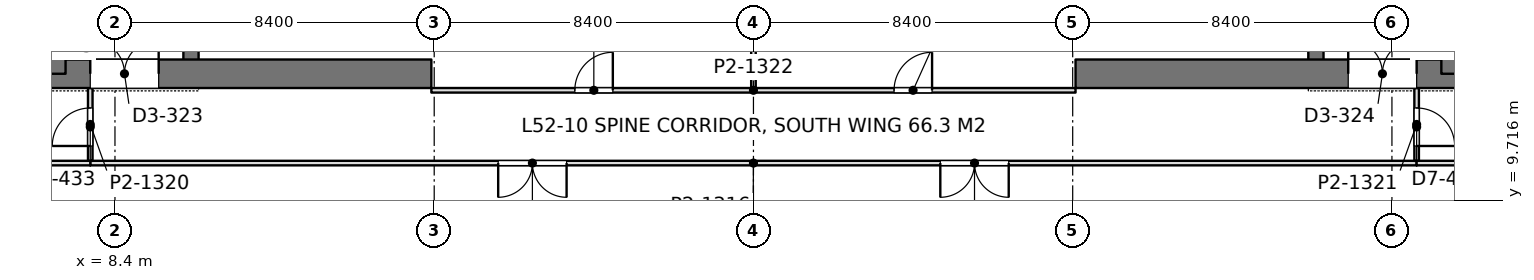
"""IFC4 building model, lengths in metres.
Left out: names, types, materials, properties, quantities, classifications, styles, units other than length and angle.
Written with IfcOpenShell. Run it as: python <this file> out.ifc"""

import sys

from ifc_helpers import new_model, si_unit, direction, frame, frame_2d, origin, place, context, subcontext, project, spatial, rectangle, extrude, element, fill, save


model = new_model("IFC4")
c1 = context("Model", 3, precision=1e-05, world=origin(), true_north=direction((0.0, 1.0)))
c2 = subcontext(c1, "Body", "Model", "MODEL_VIEW")
j1 = project(units=[si_unit("LENGTHUNIT", "METRE"), si_unit("PLANEANGLEUNIT", "RADIAN")], contexts=[c1])
p1 = place(None, origin())
s1 = spatial("IfcSite", under=j1, at=p1, CompositionType="ELEMENT")
p2 = place(p1, origin())
s2 = spatial("IfcBuilding", under=s1, at=p2, CompositionType="ELEMENT")
p3 = place(p2, frame((0.0, 0.0, 228.0)))
s3 = spatial("IfcBuildingStorey", under=s2, at=p3, CompositionType="ELEMENT", Elevation=228.0)
p4 = place(p3, frame((-1.125, 13.05, 0.0), z_axis=(0.0, 0.0, 1.0), x_axis=(1.0, 0.0, 0.0)))
e1 = element("IfcWall", 1, at=p4, inside=s3, PredefinedType="SHEAR", context=c2, shape_type="SweptSolid", body=[
    extrude(rectangle(XDim=17.85, YDim=0.75, at=frame_2d((8.925, 0.0))), origin(), (0.0, 0.0, 1.0), 4.2),
])
p5 = place(p4, frame((8.875, 0.0, 0.0)))
e2 = element("IfcOpeningElement", 2, at=p5, cuts=e1, PredefinedType="OPENING", context=c2, shape_type="SweptSolid", body=[
    extrude(rectangle(XDim=1.8, YDim=2.4, at=frame_2d((0.9, 1.2))), frame((0.0, 0.385, 0.0), z_axis=(0.0, -1.0, 0.0), x_axis=(1.0, 0.0, 0.0)), (0.0, 0.0, 1.0), 0.77),
])
p6 = place(p3, frame((6.9, 13.05, 0.0), z_axis=(0.0, 0.0, 1.0), x_axis=(0.0, 1.0, 0.0)))
e3 = element("IfcWall", 3, at=p6, inside=s3, PredefinedType="SHEAR", context=c2, shape_type="SweptSolid", body=[
    extrude(rectangle(XDim=24.3, YDim=0.4, at=frame_2d((12.15, 0.0))), origin(), (0.0, 0.0, 1.0), 4.2),
])
p7 = place(p6, frame((1.3, 0.0, 0.0)))
e4 = element("IfcOpeningElement", 4, at=p7, cuts=e3, PredefinedType="OPENING", context=c2, shape_type="SweptSolid", body=[
    extrude(rectangle(XDim=1.0, YDim=2.2, at=frame_2d((0.5, 1.1))), frame((0.0, 0.21, 0.0), z_axis=(0.0, -1.0, 0.0), x_axis=(1.0, 0.0, 0.0)), (0.0, 0.0, 1.0), 0.42),
])
p8 = place(p6, frame((22.0, 0.0, 0.0)))
e5 = element("IfcOpeningElement", 5, at=p8, cuts=e3, PredefinedType="OPENING", context=c2, shape_type="SweptSolid", body=[
    extrude(rectangle(XDim=1.0, YDim=2.2, at=frame_2d((0.5, 1.1))), frame((0.0, 0.21, 0.0), z_axis=(0.0, -1.0, 0.0), x_axis=(1.0, 0.0, 0.0)), (0.0, 0.0, 1.0), 0.42),
])
p9 = place(p6, frame((5.55, 0.0, 0.0)))
e6 = element("IfcOpeningElement", 6, at=p9, cuts=e3, PredefinedType="OPENING", context=c2, shape_type="SweptSolid", body=[
    extrude(rectangle(XDim=1.0, YDim=2.2, at=frame_2d((0.5, 1.1))), frame((0.0, 0.21, 0.0), z_axis=(0.0, -1.0, 0.0), x_axis=(1.0, 0.0, 0.0)), (0.0, 0.0, 1.0), 0.42),
])
p10 = place(p6, frame((9.55, 0.0, 0.0)))
e7 = element("IfcOpeningElement", 7, at=p10, cuts=e3, PredefinedType="OPENING", context=c2, shape_type="SweptSolid", body=[
    extrude(rectangle(XDim=1.0, YDim=2.2, at=frame_2d((0.5, 1.1))), frame((0.0, 0.21, 0.0), z_axis=(0.0, -1.0, 0.0), x_axis=(1.0, 0.0, 0.0)), (0.0, 0.0, 1.0), 0.42),
])
p11 = place(p6, frame((12.8, 0.0, 0.0)))
e8 = element("IfcOpeningElement", 8, at=p11, cuts=e3, PredefinedType="OPENING", context=c2, shape_type="SweptSolid", body=[
    extrude(rectangle(XDim=1.1, YDim=2.2, at=frame_2d((0.55, 1.1))), frame((0.0, 0.21, 0.0), z_axis=(0.0, -1.0, 0.0), x_axis=(1.0, 0.0, 0.0)), (0.0, 0.0, 1.0), 0.42),
])
p12 = place(p6, frame((15.538, 0.0, 0.0)))
e9 = element("IfcOpeningElement", 9, at=p12, cuts=e3, PredefinedType="OPENING", context=c2, shape_type="SweptSolid", body=[
    extrude(rectangle(XDim=1.1, YDim=2.2, at=frame_2d((0.55, 1.1))), frame((0.0, 0.21, 0.0), z_axis=(0.0, -1.0, 0.0), x_axis=(1.0, 0.0, 0.0)), (0.0, 0.0, 1.0), 0.42),
])
p13 = place(p6, frame((18.262, 0.0, 0.0)))
e10 = element("IfcOpeningElement", 10, at=p13, cuts=e3, PredefinedType="OPENING", context=c2, shape_type="SweptSolid", body=[
    extrude(rectangle(XDim=1.1, YDim=2.2, at=frame_2d((0.55, 1.1))), frame((0.0, 0.21, 0.0), z_axis=(0.0, -1.0, 0.0), x_axis=(1.0, 0.0, 0.0)), (0.0, 0.0, 1.0), 0.42),
])
p14 = place(p3, frame((10.4, 13.05, 0.0), z_axis=(0.0, 0.0, 1.0), x_axis=(0.0, 1.0, 0.0)))
e11 = element("IfcWall", 11, at=p14, inside=s3, PredefinedType="SHEAR", context=c2, shape_type="SweptSolid", body=[
    extrude(rectangle(XDim=24.3, YDim=0.4, at=frame_2d((12.15, 0.0))), origin(), (0.0, 0.0, 1.0), 4.2),
])
p15 = place(p14, frame((15.75, 0.0, 0.0)))
e12 = element("IfcOpeningElement", 12, at=p15, cuts=e11, PredefinedType="OPENING", context=c2, shape_type="SweptSolid", body=[
    extrude(rectangle(XDim=1.1, YDim=2.2, at=frame_2d((0.55, 1.1))), frame((0.0, 0.21, 0.0), z_axis=(0.0, -1.0, 0.0), x_axis=(1.0, 0.0, 0.0)), (0.0, 0.0, 1.0), 0.42),
])
p16 = place(p14, frame((18.6, 0.0, 0.0)))
e13 = element("IfcOpeningElement", 13, at=p16, cuts=e11, PredefinedType="OPENING", context=c2, shape_type="SweptSolid", body=[
    extrude(rectangle(XDim=1.1, YDim=2.2, at=frame_2d((0.55, 1.1))), frame((0.0, 0.21, 0.0), z_axis=(0.0, -1.0, 0.0), x_axis=(1.0, 0.0, 0.0)), (0.0, 0.0, 1.0), 0.42),
])
p17 = place(p14, frame((21.45, 0.0, 0.0)))
e14 = element("IfcOpeningElement", 14, at=p17, cuts=e11, PredefinedType="OPENING", context=c2, shape_type="SweptSolid", body=[
    extrude(rectangle(XDim=1.1, YDim=2.2, at=frame_2d((0.55, 1.1))), frame((0.0, 0.21, 0.0), z_axis=(0.0, -1.0, 0.0), x_axis=(1.0, 0.0, 0.0)), (0.0, 0.0, 1.0), 0.42),
])
p18 = place(p14, frame((8.65, 0.0, 0.0)))
e15 = element("IfcOpeningElement", 15, at=p18, cuts=e11, PredefinedType="OPENING", context=c2, shape_type="SweptSolid", body=[
    extrude(rectangle(XDim=1.8, YDim=2.4, at=frame_2d((0.9, 1.2))), frame((0.0, 0.21, 0.0), z_axis=(0.0, -1.0, 0.0), x_axis=(1.0, 0.0, 0.0)), (0.0, 0.0, 1.0), 0.42),
])
p19 = place(p3, frame((33.675, 13.05, 0.0), z_axis=(0.0, 0.0, 1.0), x_axis=(1.0, 0.0, 0.0)))
e16 = element("IfcWall", 16, at=p19, inside=s3, PredefinedType="SHEAR", context=c2, shape_type="SweptSolid", body=[
    extrude(rectangle(XDim=17.85, YDim=0.75, at=frame_2d((8.925, 0.0))), origin(), (0.0, 0.0, 1.0), 4.2),
])
p20 = place(p19, frame((7.175, 0.0, 0.0)))
e17 = element("IfcOpeningElement", 17, at=p20, cuts=e16, PredefinedType="OPENING", context=c2, shape_type="SweptSolid", body=[
    extrude(rectangle(XDim=1.8, YDim=2.4, at=frame_2d((0.9, 1.2))), frame((0.0, 0.385, 0.0), z_axis=(0.0, -1.0, 0.0), x_axis=(1.0, 0.0, 0.0)), (0.0, 0.0, 1.0), 0.77),
])
p21 = place(p3, frame((43.5, 13.05, 0.0), z_axis=(0.0, 0.0, 1.0), x_axis=(0.0, 1.0, 0.0)))
e18 = element("IfcWall", 18, at=p21, inside=s3, PredefinedType="SHEAR", context=c2, shape_type="SweptSolid", body=[
    extrude(rectangle(XDim=24.3, YDim=0.4, at=frame_2d((12.15, 0.0))), origin(), (0.0, 0.0, 1.0), 4.2),
])
p22 = place(p21, frame((1.3, 0.0, 0.0)))
e19 = element("IfcOpeningElement", 19, at=p22, cuts=e18, PredefinedType="OPENING", context=c2, shape_type="SweptSolid", body=[
    extrude(rectangle(XDim=1.0, YDim=2.2, at=frame_2d((0.5, 1.1))), frame((0.0, 0.21, 0.0), z_axis=(0.0, -1.0, 0.0), x_axis=(1.0, 0.0, 0.0)), (0.0, 0.0, 1.0), 0.42),
])
p23 = place(p21, frame((22.0, 0.0, 0.0)))
e20 = element("IfcOpeningElement", 20, at=p23, cuts=e18, PredefinedType="OPENING", context=c2, shape_type="SweptSolid", body=[
    extrude(rectangle(XDim=1.0, YDim=2.2, at=frame_2d((0.5, 1.1))), frame((0.0, 0.21, 0.0), z_axis=(0.0, -1.0, 0.0), x_axis=(1.0, 0.0, 0.0)), (0.0, 0.0, 1.0), 0.42),
])
p24 = place(p21, frame((5.55, 0.0, 0.0)))
e21 = element("IfcOpeningElement", 21, at=p24, cuts=e18, PredefinedType="OPENING", context=c2, shape_type="SweptSolid", body=[
    extrude(rectangle(XDim=1.0, YDim=2.2, at=frame_2d((0.5, 1.1))), frame((0.0, 0.21, 0.0), z_axis=(0.0, -1.0, 0.0), x_axis=(1.0, 0.0, 0.0)), (0.0, 0.0, 1.0), 0.42),
])
p25 = place(p21, frame((9.55, 0.0, 0.0)))
e22 = element("IfcOpeningElement", 22, at=p25, cuts=e18, PredefinedType="OPENING", context=c2, shape_type="SweptSolid", body=[
    extrude(rectangle(XDim=1.0, YDim=2.2, at=frame_2d((0.5, 1.1))), frame((0.0, 0.21, 0.0), z_axis=(0.0, -1.0, 0.0), x_axis=(1.0, 0.0, 0.0)), (0.0, 0.0, 1.0), 0.42),
])
p26 = place(p21, frame((12.8, 0.0, 0.0)))
e23 = element("IfcOpeningElement", 23, at=p26, cuts=e18, PredefinedType="OPENING", context=c2, shape_type="SweptSolid", body=[
    extrude(rectangle(XDim=1.1, YDim=2.2, at=frame_2d((0.55, 1.1))), frame((0.0, 0.21, 0.0), z_axis=(0.0, -1.0, 0.0), x_axis=(1.0, 0.0, 0.0)), (0.0, 0.0, 1.0), 0.42),
])
p27 = place(p21, frame((15.538, 0.0, 0.0)))
e24 = element("IfcOpeningElement", 24, at=p27, cuts=e18, PredefinedType="OPENING", context=c2, shape_type="SweptSolid", body=[
    extrude(rectangle(XDim=1.1, YDim=2.2, at=frame_2d((0.55, 1.1))), frame((0.0, 0.21, 0.0), z_axis=(0.0, -1.0, 0.0), x_axis=(1.0, 0.0, 0.0)), (0.0, 0.0, 1.0), 0.42),
])
p28 = place(p21, frame((18.262, 0.0, 0.0)))
e25 = element("IfcOpeningElement", 25, at=p28, cuts=e18, PredefinedType="OPENING", context=c2, shape_type="SweptSolid", body=[
    extrude(rectangle(XDim=1.1, YDim=2.2, at=frame_2d((0.55, 1.1))), frame((0.0, 0.21, 0.0), z_axis=(0.0, -1.0, 0.0), x_axis=(1.0, 0.0, 0.0)), (0.0, 0.0, 1.0), 0.42),
])
p29 = place(p3, frame((40.0, 13.05, 0.0), z_axis=(0.0, 0.0, 1.0), x_axis=(0.0, 1.0, 0.0)))
e26 = element("IfcWall", 26, at=p29, inside=s3, PredefinedType="SHEAR", context=c2, shape_type="SweptSolid", body=[
    extrude(rectangle(XDim=24.3, YDim=0.4, at=frame_2d((12.15, 0.0))), origin(), (0.0, 0.0, 1.0), 4.2),
])
p30 = place(p29, frame((15.75, 0.0, 0.0)))
e27 = element("IfcOpeningElement", 27, at=p30, cuts=e26, PredefinedType="OPENING", context=c2, shape_type="SweptSolid", body=[
    extrude(rectangle(XDim=1.1, YDim=2.2, at=frame_2d((0.55, 1.1))), frame((0.0, 0.21, 0.0), z_axis=(0.0, -1.0, 0.0), x_axis=(1.0, 0.0, 0.0)), (0.0, 0.0, 1.0), 0.42),
])
p31 = place(p29, frame((18.6, 0.0, 0.0)))
e28 = element("IfcOpeningElement", 28, at=p31, cuts=e26, PredefinedType="OPENING", context=c2, shape_type="SweptSolid", body=[
    extrude(rectangle(XDim=1.1, YDim=2.2, at=frame_2d((0.55, 1.1))), frame((0.0, 0.21, 0.0), z_axis=(0.0, -1.0, 0.0), x_axis=(1.0, 0.0, 0.0)), (0.0, 0.0, 1.0), 0.42),
])
p32 = place(p29, frame((21.45, 0.0, 0.0)))
e29 = element("IfcOpeningElement", 29, at=p32, cuts=e26, PredefinedType="OPENING", context=c2, shape_type="SweptSolid", body=[
    extrude(rectangle(XDim=1.1, YDim=2.2, at=frame_2d((0.55, 1.1))), frame((0.0, 0.21, 0.0), z_axis=(0.0, -1.0, 0.0), x_axis=(1.0, 0.0, 0.0)), (0.0, 0.0, 1.0), 0.42),
])
p33 = place(p29, frame((8.65, 0.0, 0.0)))
e30 = element("IfcOpeningElement", 30, at=p33, cuts=e26, PredefinedType="OPENING", context=c2, shape_type="SweptSolid", body=[
    extrude(rectangle(XDim=1.8, YDim=2.4, at=frame_2d((0.9, 1.2))), frame((0.0, 0.21, 0.0), z_axis=(0.0, -1.0, 0.0), x_axis=(1.0, 0.0, 0.0)), (0.0, 0.0, 1.0), 0.42),
])
p34 = place(p3, frame((7.748, 10.7, 0.0), z_axis=(0.0, 0.0, 1.0), x_axis=(1.0, 0.0, 0.0)))
e31 = element("IfcWall", 31, at=p34, inside=s3, PredefinedType="PARTITIONING", context=c2, shape_type="SweptSolid", body=[
    extrude(rectangle(XDim=34.904, YDim=0.12, at=frame_2d((17.452, 0.0))), origin(), (0.0, 0.0, 1.0), 3.55),
])
p35 = place(p34, frame((10.735, 0.0, 0.0)))
e32 = element("IfcOpeningElement", 32, at=p35, cuts=e31, PredefinedType="OPENING", context=c2, shape_type="SweptSolid", body=[
    extrude(rectangle(XDim=1.8, YDim=2.2, at=frame_2d((0.9, 1.1))), frame((0.0, 0.07, 0.0), z_axis=(0.0, -1.0, 0.0), x_axis=(1.0, 0.0, 0.0)), (0.0, 0.0, 1.0), 0.14),
])
p36 = place(p34, frame((22.369, 0.0, 0.0)))
e33 = element("IfcOpeningElement", 33, at=p36, cuts=e31, PredefinedType="OPENING", context=c2, shape_type="SweptSolid", body=[
    extrude(rectangle(XDim=1.8, YDim=2.2, at=frame_2d((0.9, 1.1))), frame((0.0, 0.07, 0.0), z_axis=(0.0, -1.0, 0.0), x_axis=(1.0, 0.0, 0.0)), (0.0, 0.0, 1.0), 0.14),
])
p37 = place(p3, frame((7.75, 10.758, 0.0), z_axis=(0.0, 0.0, 1.0), x_axis=(0.0, 1.0, 0.0)))
e34 = element("IfcWall", 34, at=p37, inside=s3, PredefinedType="PARTITIONING", context=c2, shape_type="SweptSolid", body=[
    extrude(rectangle(XDim=1.918, YDim=0.12, at=frame_2d((0.959, 0.0))), origin(), (0.0, 0.0, 1.0), 4.05),
])
p38 = place(p37, frame((0.392, 0.0, 0.0)))
e35 = element("IfcOpeningElement", 35, at=p38, cuts=e34, PredefinedType="OPENING", context=c2, shape_type="SweptSolid", body=[
    extrude(rectangle(XDim=1.0, YDim=2.4, at=frame_2d((0.5, 1.2))), frame((0.0, 0.07, 0.0), z_axis=(0.0, -1.0, 0.0), x_axis=(1.0, 0.0, 0.0)), (0.0, 0.0, 1.0), 0.14),
])
p39 = place(p3, frame((42.65, 10.758, 0.0), z_axis=(0.0, 0.0, 1.0), x_axis=(0.0, 1.0, 0.0)))
e36 = element("IfcWall", 36, at=p39, inside=s3, PredefinedType="PARTITIONING", context=c2, shape_type="SweptSolid", body=[
    extrude(rectangle(XDim=1.918, YDim=0.12, at=frame_2d((0.959, 0.0))), origin(), (0.0, 0.0, 1.0), 4.05),
])
p40 = place(p39, frame((0.392, 0.0, 0.0)))
e37 = element("IfcOpeningElement", 37, at=p40, cuts=e36, PredefinedType="OPENING", context=c2, shape_type="SweptSolid", body=[
    extrude(rectangle(XDim=1.0, YDim=2.4, at=frame_2d((0.5, 1.2))), frame((0.0, 0.07, 0.0), z_axis=(0.0, -1.0, 0.0), x_axis=(1.0, 0.0, 0.0)), (0.0, 0.0, 1.0), 0.14),
])
for number, where, z_axis, x_axis in (
    (38, (1.2, 10.7, 0.0), (0.0, 0.0, 1.0), (1.0, 0.0, 0.0)),
    (39, (42.648, 10.7, 0.0), (0.0, 0.0, 1.0), (1.0, 0.0, 0.0)),
):
    element("IfcWall", number, at=place(p3, frame(where, z_axis=z_axis, x_axis=x_axis)), inside=s3, PredefinedType="PARTITIONING", context=c2, shape_type="SweptSolid", body=[
        extrude(rectangle(XDim=6.552, YDim=0.12, at=frame_2d((3.276, 0.0))), origin(), (0.0, 0.0, 1.0), 4.05),
    ])
p41 = place(p3, frame((25.2, 12.658, 0.0), z_axis=(0.0, 0.0, 1.0), x_axis=(0.0, 1.0, 0.0)))
e40 = element("IfcWall", 40, at=p41, inside=s3, PredefinedType="PARTITIONING", context=c2, shape_type="SweptSolid", body=[
    extrude(rectangle(XDim=3.593, YDim=0.12, at=frame_2d((1.796, 0.0))), origin(), (0.0, 0.0, 1.0), 3.55),
])
p42 = place(p3, frame((16.725, 12.615, 0.0), z_axis=(0.0, 0.0, 1.0), x_axis=(1.0, 0.0, 0.0)))
e41 = element("IfcWall", 41, at=p42, inside=s3, PredefinedType="PARTITIONING", context=c2, shape_type="SweptSolid", body=[
    extrude(rectangle(XDim=16.95, YDim=0.12, at=frame_2d((8.475, 0.0))), origin(), (0.0, 0.0, 1.0), 3.55),
])
p43 = place(p42, frame((3.775, 0.0, 0.0)))
e42 = element("IfcOpeningElement", 42, at=p43, cuts=e41, PredefinedType="OPENING", context=c2, shape_type="SweptSolid", body=[
    extrude(rectangle(XDim=1.0, YDim=2.4, at=frame_2d((0.5, 1.2))), frame((0.0, 0.07, 0.0), z_axis=(0.0, -1.0, 0.0), x_axis=(1.0, 0.0, 0.0)), (0.0, 0.0, 1.0), 0.14),
])
p44 = place(p42, frame((12.175, 0.0, 0.0)))
e43 = element("IfcOpeningElement", 43, at=p44, cuts=e41, PredefinedType="OPENING", context=c2, shape_type="SweptSolid", body=[
    extrude(rectangle(XDim=1.0, YDim=2.4, at=frame_2d((0.5, 1.2))), frame((0.0, 0.07, 0.0), z_axis=(0.0, -1.0, 0.0), x_axis=(1.0, 0.0, 0.0)), (0.0, 0.0, 1.0), 0.14),
])
p45 = place(p5, origin())
e44 = element("IfcDoor", 44, at=p45, inside=s3, OperationType="DOUBLE_DOOR_SINGLE_SWING", PredefinedType="DOOR", context=c2, shape_type="SweptSolid", body=[
    extrude(rectangle(XDim=1.8, YDim=2.4, at=frame_2d((0.9, 1.2))), frame((0.0, 0.025, 0.0), z_axis=(0.0, -1.0, 0.0), x_axis=(1.0, 0.0, 0.0)), (0.0, 0.0, 1.0), 0.05),
])
fill(e2, e44)
p46 = place(p20, origin())
e45 = element("IfcDoor", 45, at=p46, inside=s3, OperationType="DOUBLE_DOOR_SINGLE_SWING", PredefinedType="DOOR", context=c2, shape_type="SweptSolid", body=[
    extrude(rectangle(XDim=1.8, YDim=2.4, at=frame_2d((0.9, 1.2))), frame((0.0, 0.025, 0.0), z_axis=(0.0, -1.0, 0.0), x_axis=(1.0, 0.0, 0.0)), (0.0, 0.0, 1.0), 0.05),
])
fill(e17, e45)
p47 = place(p35, frame((1.8, 0.0, 0.0), z_axis=(0.0, 0.0, 1.0), x_axis=(-1.0, 0.0, 0.0)))
e46 = element("IfcDoor", 46, at=p47, inside=s3, OperationType="DOUBLE_DOOR_SINGLE_SWING", PredefinedType="DOOR", context=c2, shape_type="SweptSolid", body=[
    extrude(rectangle(XDim=1.8, YDim=2.2, at=frame_2d((0.9, 1.1))), frame((0.0, 0.025, 0.0), z_axis=(0.0, -1.0, 0.0), x_axis=(1.0, 0.0, 0.0)), (0.0, 0.0, 1.0), 0.05),
])
fill(e32, e46)
p48 = place(p36, frame((1.8, 0.0, 0.0), z_axis=(0.0, 0.0, 1.0), x_axis=(-1.0, 0.0, 0.0)))
e47 = element("IfcDoor", 47, at=p48, inside=s3, OperationType="DOUBLE_DOOR_SINGLE_SWING", PredefinedType="DOOR", context=c2, shape_type="SweptSolid", body=[
    extrude(rectangle(XDim=1.8, YDim=2.2, at=frame_2d((0.9, 1.1))), frame((0.0, 0.025, 0.0), z_axis=(0.0, -1.0, 0.0), x_axis=(1.0, 0.0, 0.0)), (0.0, 0.0, 1.0), 0.05),
])
fill(e33, e47)
p49 = place(p38, origin())
e48 = element("IfcDoor", 48, at=p49, inside=s3, OperationType="SINGLE_SWING_LEFT", PredefinedType="DOOR", context=c2, shape_type="SweptSolid", body=[
    extrude(rectangle(XDim=1.0, YDim=2.4, at=frame_2d((0.5, 1.2))), frame((0.0, 0.025, 0.0), z_axis=(0.0, -1.0, 0.0), x_axis=(1.0, 0.0, 0.0)), (0.0, 0.0, 1.0), 0.05),
])
fill(e35, e48)
p50 = place(p40, frame((1.0, 0.0, 0.0), z_axis=(0.0, 0.0, 1.0), x_axis=(-1.0, 0.0, 0.0)))
e49 = element("IfcDoor", 49, at=p50, inside=s3, OperationType="SINGLE_SWING_RIGHT", PredefinedType="DOOR", context=c2, shape_type="SweptSolid", body=[
    extrude(rectangle(XDim=1.0, YDim=2.4, at=frame_2d((0.5, 1.2))), frame((0.0, 0.025, 0.0), z_axis=(0.0, -1.0, 0.0), x_axis=(1.0, 0.0, 0.0)), (0.0, 0.0, 1.0), 0.05),
])
fill(e37, e49)
p51 = place(p43, origin())
e50 = element("IfcDoor", 50, at=p51, inside=s3, OperationType="SINGLE_SWING_RIGHT", PredefinedType="DOOR", context=c2, shape_type="SweptSolid", body=[
    extrude(rectangle(XDim=1.0, YDim=2.4, at=frame_2d((0.5, 1.2))), frame((0.0, 0.025, 0.0), z_axis=(0.0, -1.0, 0.0), x_axis=(1.0, 0.0, 0.0)), (0.0, 0.0, 1.0), 0.05),
])
fill(e42, e50)
p52 = place(p44, origin())
e51 = element("IfcDoor", 51, at=p52, inside=s3, OperationType="SINGLE_SWING_RIGHT", PredefinedType="DOOR", context=c2, shape_type="SweptSolid", body=[
    extrude(rectangle(XDim=1.0, YDim=2.4, at=frame_2d((0.5, 1.2))), frame((0.0, 0.025, 0.0), z_axis=(0.0, -1.0, 0.0), x_axis=(1.0, 0.0, 0.0)), (0.0, 0.0, 1.0), 0.05),
])
fill(e43, e51)
save(model, sys.argv[1])
